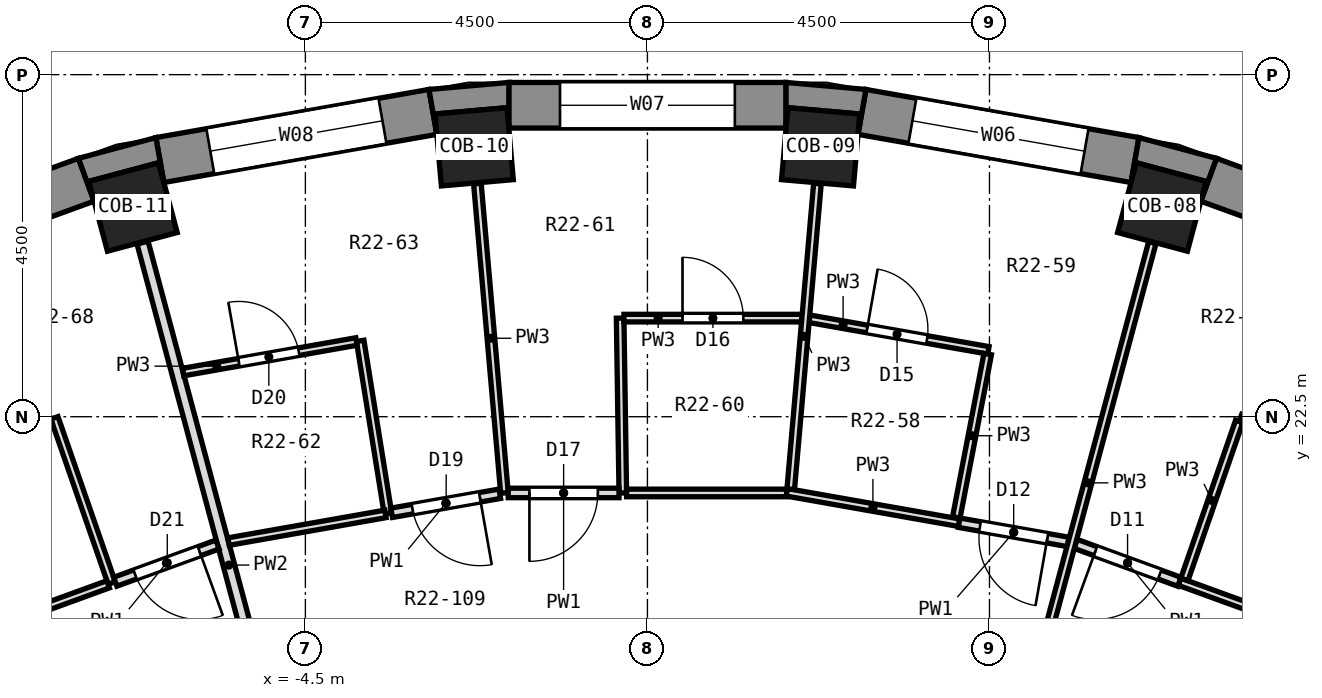
"""IFC4 building model, lengths in metres.
Left out: names, types, materials, properties, quantities, classifications, styles, units other than length and angle.
Written with IfcOpenShell. Run it as: python <this file> out.ifc"""

import sys

from ifc_helpers import new_model, si_unit, direction, frame, frame_2d, origin, origin_2d, place, context, subcontext, project, spatial, polyline, rectangle, outline, extrude, element, fill, save


model = new_model("IFC4")
c1 = context("Model", 3, precision=1e-05, world=origin(), true_north=direction((0.0, 1.0)))
c2 = subcontext(c1, "Body", "Model", "MODEL_VIEW")
j1 = project(units=[si_unit("LENGTHUNIT", "METRE"), si_unit("PLANEANGLEUNIT", "RADIAN")], contexts=[c1])
p1 = place(None, origin())
s1 = spatial("IfcSite", under=j1, at=p1, CompositionType="ELEMENT")
p2 = place(p1, origin())
s2 = spatial("IfcBuilding", under=s1, at=p2, CompositionType="ELEMENT")
p3 = place(p2, frame((0.0, 0.0, 141.4)))
s3 = spatial("IfcBuildingStorey", under=s2, at=p3, CompositionType="ELEMENT", Elevation=141.4)
for number, where, z_axis, x_axis in (
    (1, (6.768, 25.259, 0.0), (0.0, 0.0, 1.0), (0.259, 0.966, 0.0)),
    (2, (2.279, 26.051, 0.0), (0.0, 0.0, 1.0), (0.087, 0.996, 0.0)),
    (3, (-2.279, 26.051, 0.0), (0.0, 0.0, 1.0), (-0.087, 0.996, 0.0)),
    (4, (-6.768, 25.259, 0.0), (0.0, 0.0, 1.0), (-0.259, 0.966, 0.0)),
):
    element("IfcColumn", number, at=place(p3, frame(where, z_axis=z_axis, x_axis=x_axis)), inside=s3, PredefinedType="COLUMN", context=c2, shape_type="SweptSolid", body=[
        extrude(rectangle(XDim=0.95, YDim=0.95, at=origin_2d()), origin(), (0.0, 0.0, 1.0), 3.3),
    ])
p4 = place(p3, frame((10.811, 24.369, 0.0), z_axis=(0.0, 0.0, 1.0), x_axis=(-0.939703505393, 0.341990236633, 0.0)))
e5 = element("IfcWall", 5, at=p4, inside=s3, PredefinedType="SOLIDWALL", context=c2, shape_type="SweptSolid", body=[
    extrude(rectangle(XDim=3.648, YDim=0.6, at=frame_2d((1.824, 0.0))), origin(), (0.0, 0.0, 1.0), 2.8),
])
p5 = place(p4, frame((0.674, 0.0, 0.9)))
e6 = element("IfcOpeningElement", 6, at=p5, cuts=e5, PredefinedType="OPENING", context=c2, shape_type="SweptSolid", body=[
    extrude(rectangle(XDim=2.3, YDim=1.8, at=frame_2d((1.15, 0.9))), frame((0.0, 0.312, 0.0), z_axis=(0.0, -1.0, 0.0), x_axis=(1.0, 0.0, 0.0)), (0.0, 0.0, 1.0), 0.624),
])
p6 = place(p3, frame((6.415, 25.876, 0.0), z_axis=(0.0, 0.0, 1.0), x_axis=(-0.984803764455, 0.173670796382, 0.0)))
e7 = element("IfcWall", 7, at=p6, inside=s3, PredefinedType="SOLIDWALL", context=c2, shape_type="SweptSolid", body=[
    extrude(rectangle(XDim=3.648, YDim=0.6, at=frame_2d((1.824, 0.0))), origin(), (0.0, 0.0, 1.0), 2.8),
])
p7 = place(p6, frame((0.674, 0.0, 0.9)))
e8 = element("IfcOpeningElement", 8, at=p7, cuts=e7, PredefinedType="OPENING", context=c2, shape_type="SweptSolid", body=[
    extrude(rectangle(XDim=2.3, YDim=1.8, at=frame_2d((1.15, 0.9))), frame((0.0, 0.312, 0.0), z_axis=(0.0, -1.0, 0.0), x_axis=(1.0, 0.0, 0.0)), (0.0, 0.0, 1.0), 0.624),
])
p8 = place(p3, frame((1.824, 26.597, 0.0), z_axis=(0.0, 0.0, 1.0), x_axis=(-1.0, 0.0, 0.0)))
e9 = element("IfcWall", 9, at=p8, inside=s3, PredefinedType="SOLIDWALL", context=c2, shape_type="SweptSolid", body=[
    extrude(rectangle(XDim=3.648, YDim=0.6, at=frame_2d((1.824, 0.0))), origin(), (0.0, 0.0, 1.0), 2.8),
])
p9 = place(p8, frame((0.674, 0.0, 0.9)))
e10 = element("IfcOpeningElement", 10, at=p9, cuts=e9, PredefinedType="OPENING", context=c2, shape_type="SweptSolid", body=[
    extrude(rectangle(XDim=2.3, YDim=1.8, at=frame_2d((1.15, 0.9))), frame((0.0, 0.312, 0.0), z_axis=(0.0, -1.0, 0.0), x_axis=(1.0, 0.0, 0.0)), (0.0, 0.0, 1.0), 0.624),
])
p10 = place(p3, frame((-2.822, 26.51, 0.0), z_axis=(0.0, 0.0, 1.0), x_axis=(-0.984803764455, -0.173670796382, 0.0)))
e11 = element("IfcWall", 11, at=p10, inside=s3, PredefinedType="SOLIDWALL", context=c2, shape_type="SweptSolid", body=[
    extrude(rectangle(XDim=3.648, YDim=0.6, at=frame_2d((1.824, 0.0))), origin(), (0.0, 0.0, 1.0), 2.8),
])
p11 = place(p10, frame((0.674, 0.0, 0.9)))
e12 = element("IfcOpeningElement", 12, at=p11, cuts=e11, PredefinedType="OPENING", context=c2, shape_type="SweptSolid", body=[
    extrude(rectangle(XDim=2.3, YDim=1.8, at=frame_2d((1.15, 0.9))), frame((0.0, 0.312, 0.0), z_axis=(0.0, -1.0, 0.0), x_axis=(1.0, 0.0, 0.0)), (0.0, 0.0, 1.0), 0.624),
])
p12 = place(p3, frame((-7.383, 25.617, 0.0), z_axis=(0.0, 0.0, 1.0), x_axis=(-0.939703505393, -0.341990236633, 0.0)))
e13 = element("IfcWall", 13, at=p12, inside=s3, PredefinedType="SOLIDWALL", context=c2, shape_type="SweptSolid", body=[
    extrude(rectangle(XDim=3.648, YDim=0.6, at=frame_2d((1.824, 0.0))), origin(), (0.0, 0.0, 1.0), 2.8),
])
p13 = place(p12, frame((0.674, 0.0, 0.9)))
e14 = element("IfcOpeningElement", 14, at=p13, cuts=e13, PredefinedType="OPENING", context=c2, shape_type="SweptSolid", body=[
    extrude(rectangle(XDim=2.3, YDim=1.8, at=frame_2d((1.15, 0.9))), frame((0.0, 0.312, 0.0), z_axis=(0.0, -1.0, 0.0), x_axis=(1.0, 0.0, 0.0)), (0.0, 0.0, 1.0), 0.624),
])
p14 = place(p3, origin())
e15 = element("IfcWall", 15, at=p14, inside=s3, PredefinedType="SOLIDWALL", context=c2, shape_type="SweptSolid", body=[
    extrude(outline(polyline([(7.486, 25.899), (6.467, 26.172), (6.363, 25.581), (6.432, 25.841), (7.35, 25.595), (7.28, 25.335), (7.486, 25.899)])), origin(), (0.0, 0.0, 1.0), 2.8),
])
p15 = place(p3, origin())
e16 = element("IfcWall", 16, at=p15, inside=s3, PredefinedType="SOLIDWALL", context=c2, shape_type="SweptSolid", body=[
    extrude(outline(polyline([(2.875, 26.805), (1.824, 26.897), (1.824, 26.297), (1.847, 26.565), (2.794, 26.482), (2.77, 26.215), (2.875, 26.805)])), origin(), (0.0, 0.0, 1.0), 2.8),
])
p16 = place(p3, origin())
e17 = element("IfcWall", 17, at=p16, inside=s3, PredefinedType="SOLIDWALL", context=c2, shape_type="SweptSolid", body=[
    extrude(outline(polyline([(-2.875, 26.805), (-2.77, 26.215), (-2.794, 26.482), (-1.847, 26.565), (-1.824, 26.297), (-1.824, 26.897), (-2.875, 26.805)])), origin(), (0.0, 0.0, 1.0), 2.8),
])
p17 = place(p3, origin())
e18 = element("IfcWall", 18, at=p17, inside=s3, PredefinedType="SOLIDWALL", context=c2, shape_type="SweptSolid", body=[
    extrude(outline(polyline([(-6.467, 26.172), (-7.486, 25.899), (-7.28, 25.335), (-7.35, 25.595), (-6.432, 25.841), (-6.363, 25.581), (-6.467, 26.172)])), origin(), (0.0, 0.0, 1.0), 2.8),
])
p18 = place(p3, frame((-0.359, 23.797, 0.0), z_axis=(0.0, 0.0, 1.0), x_axis=(0.015177107463, -0.999884821071, 0.0)))
e19 = element("IfcWall", 19, at=p18, inside=s3, PredefinedType="PARTITIONING", context=c2, shape_type="SweptSolid", body=[
    extrude(rectangle(XDim=2.3, YDim=0.1, at=frame_2d((1.15, 0.0))), origin(), (0.0, 0.0, 1.0), 2.8),
])
p19 = place(p3, frame((-2.237, 25.567, 0.0), z_axis=(0.0, 0.0, 1.0), x_axis=(0.087119511186, -0.996197867279, 0.0)))
e20 = element("IfcWall", 20, at=p19, inside=s3, PredefinedType="PARTITIONING", context=c2, shape_type="SweptSolid", body=[
    extrude(rectangle(XDim=4.086, YDim=0.1, at=frame_2d((2.043, 0.0))), origin(), (0.0, 0.0, 1.0), 2.8),
])
p20 = place(p3, frame((-3.779, 23.498, 0.0), z_axis=(0.0, 0.0, 1.0), x_axis=(0.15868179071, -0.987329777378, 0.0)))
e21 = element("IfcWall", 21, at=p20, inside=s3, PredefinedType="PARTITIONING", context=c2, shape_type="SweptSolid", body=[
    extrude(rectangle(XDim=2.3, YDim=0.1, at=frame_2d((1.15, 0.0))), origin(), (0.0, 0.0, 1.0), 2.8),
])
p21 = place(p3, frame((-6.643, 24.791, 0.0), z_axis=(0.0, 0.0, 1.0), x_axis=(0.258629569049, -0.965976576328, 0.0)))
e22 = element("IfcWall", 22, at=p21, inside=s3, PredefinedType="PARTITIONING", context=c2, shape_type="SweptSolid", body=[
    extrude(rectangle(XDim=8.784, YDim=0.15, at=frame_2d((4.392, 0.0))), origin(), (0.0, 0.0, 1.0), 2.8),
])
p22 = place(p3, frame((-7.802, 22.485, 0.0), z_axis=(0.0, 0.0, 1.0), x_axis=(0.327763034971, -0.944759965762, 0.0)))
e23 = element("IfcWall", 23, at=p22, inside=s3, PredefinedType="PARTITIONING", context=c2, shape_type="SweptSolid", body=[
    extrude(rectangle(XDim=2.3, YDim=0.1, at=frame_2d((1.15, 0.0))), origin(), (0.0, 0.0, 1.0), 2.8),
])
p23 = place(p3, frame((5.633, 20.827, 0.0), z_axis=(0.0, 0.0, 1.0), x_axis=(0.939292989356, -0.343116132159, 0.0)))
e24 = element("IfcWall", 24, at=p23, inside=s3, PredefinedType="PARTITIONING", context=c2, shape_type="SweptSolid", body=[
    extrude(rectangle(XDim=1.456, YDim=0.125, at=frame_2d((0.728, 0.0))), origin(), (0.0, 0.0, 1.0), 2.8),
])
p24 = place(p23, frame((0.278, 0.0, 0.0)))
e25 = element("IfcOpeningElement", 25, at=p24, cuts=e24, PredefinedType="OPENING", context=c2, shape_type="SweptSolid", body=[
    extrude(rectangle(XDim=0.9, YDim=2.1, at=frame_2d((0.45, 1.05))), frame((0.0, 0.074, 0.0), z_axis=(0.0, -1.0, 0.0), x_axis=(1.0, 0.0, 0.0)), (0.0, 0.0, 1.0), 0.149),
])
p25 = place(p3, frame((7.001, 20.329, 0.0), z_axis=(0.0, 0.0, 1.0), x_axis=(0.939728749343, -0.341920864613, 0.0)))
e26 = element("IfcWall", 26, at=p25, inside=s3, PredefinedType="PARTITIONING", context=c2, shape_type="SweptSolid", body=[
    extrude(rectangle(XDim=2.205, YDim=0.1, at=frame_2d((1.103, 0.0))), origin(), (0.0, 0.0, 1.0), 2.8),
])
p26 = place(p3, frame((7.802, 22.485, 0.0), z_axis=(0.0, 0.0, 1.0), x_axis=(0.939659214987, -0.342111911063, 0.0)))
e27 = element("IfcWall", 27, at=p26, inside=s3, PredefinedType="PARTITIONING", context=c2, shape_type="SweptSolid", body=[
    extrude(rectangle(XDim=2.391, YDim=0.1, at=frame_2d((1.196, 0.0))), origin(), (0.0, 0.0, 1.0), 2.8),
])
p27 = place(p26, frame((0.821, 0.0, 0.0)))
e28 = element("IfcOpeningElement", 28, at=p27, cuts=e27, PredefinedType="OPENING", context=c2, shape_type="SweptSolid", body=[
    extrude(rectangle(XDim=0.8, YDim=2.1, at=frame_2d((0.4, 1.05))), frame((0.0, 0.062, 0.0), z_axis=(0.0, -1.0, 0.0), x_axis=(1.0, 0.0, 0.0)), (0.0, 0.0, 1.0), 0.124),
])
p28 = place(p3, frame((1.831, 21.506, 0.0), z_axis=(0.0, 0.0, 1.0), x_axis=(0.984783558818, -0.173785333909, 0.0)))
e29 = element("IfcWall", 29, at=p28, inside=s3, PredefinedType="PARTITIONING", context=c2, shape_type="SweptSolid", body=[
    extrude(rectangle(XDim=2.305, YDim=0.1, at=frame_2d((1.153, 0.0))), origin(), (0.0, 0.0, 1.0), 2.8),
])
p29 = place(p3, frame((4.101, 21.105, 0.0), z_axis=(0.0, 0.0, 1.0), x_axis=(0.984862774054, -0.173335848233, 0.0)))
e30 = element("IfcWall", 30, at=p29, inside=s3, PredefinedType="PARTITIONING", context=c2, shape_type="SweptSolid", body=[
    extrude(rectangle(XDim=1.456, YDim=0.125, at=frame_2d((0.728, 0.0))), origin(), (0.0, 0.0, 1.0), 2.8),
])
p30 = place(p29, frame((0.278, 0.0, 0.0)))
e31 = element("IfcOpeningElement", 31, at=p30, cuts=e30, PredefinedType="OPENING", context=c2, shape_type="SweptSolid", body=[
    extrude(rectangle(XDim=0.9, YDim=2.1, at=frame_2d((0.45, 1.05))), frame((0.0, 0.074, 0.0), z_axis=(0.0, -1.0, 0.0), x_axis=(1.0, 0.0, 0.0)), (0.0, 0.0, 1.0), 0.149),
])
p31 = place(p3, frame((2.131, 23.788, 0.0), z_axis=(0.0, 0.0, 1.0), x_axis=(0.984802055472, -0.173680486922, 0.0)))
e32 = element("IfcWall", 32, at=p31, inside=s3, PredefinedType="PARTITIONING", context=c2, shape_type="SweptSolid", body=[
    extrude(rectangle(XDim=2.391, YDim=0.1, at=frame_2d((1.196, 0.0))), origin(), (0.0, 0.0, 1.0), 2.8),
])
p32 = place(p31, frame((0.771, 0.0, 0.0)))
e33 = element("IfcOpeningElement", 33, at=p32, cuts=e32, PredefinedType="OPENING", context=c2, shape_type="SweptSolid", body=[
    extrude(rectangle(XDim=0.8, YDim=2.1, at=frame_2d((0.4, 1.05))), frame((0.0, 0.062, 0.0), z_axis=(0.0, -1.0, 0.0), x_axis=(1.0, 0.0, 0.0)), (0.0, 0.0, 1.0), 0.124),
])
p33 = place(p3, frame((-0.274, 21.497, 0.0), z_axis=(0.0, 0.0, 1.0), x_axis=(1.0, 0.0, 0.0)))
e34 = element("IfcWall", 34, at=p33, inside=s3, PredefinedType="PARTITIONING", context=c2, shape_type="SweptSolid", body=[
    extrude(rectangle(XDim=2.105, YDim=0.1, at=frame_2d((1.052, 0.0))), origin(), (0.0, 0.0, 1.0), 2.8),
])
p34 = place(p3, frame((-1.831, 21.497, 0.0), z_axis=(0.0, 0.0, 1.0), x_axis=(1.0, 0.0, 0.0)))
e35 = element("IfcWall", 35, at=p34, inside=s3, PredefinedType="PARTITIONING", context=c2, shape_type="SweptSolid", body=[
    extrude(rectangle(XDim=1.457, YDim=0.125, at=frame_2d((0.729, 0.0))), origin(), (0.0, 0.0, 1.0), 2.8),
])
p35 = place(p34, frame((0.279, 0.0, 0.0)))
e36 = element("IfcOpeningElement", 36, at=p35, cuts=e35, PredefinedType="OPENING", context=c2, shape_type="SweptSolid", body=[
    extrude(rectangle(XDim=0.9, YDim=2.1, at=frame_2d((0.45, 1.05))), frame((0.0, 0.074, 0.0), z_axis=(0.0, -1.0, 0.0), x_axis=(1.0, 0.0, 0.0)), (0.0, 0.0, 1.0), 0.149),
])
p36 = place(p3, frame((-0.309, 23.797, 0.0), z_axis=(0.0, 0.0, 1.0), x_axis=(1.0, 0.0, 0.0)))
e37 = element("IfcWall", 37, at=p36, inside=s3, PredefinedType="PARTITIONING", context=c2, shape_type="SweptSolid", body=[
    extrude(rectangle(XDim=2.341, YDim=0.1, at=frame_2d((1.17, 0.0))), origin(), (0.0, 0.0, 1.0), 2.8),
])
p37 = place(p36, frame((0.771, 0.0, 0.0)))
e38 = element("IfcOpeningElement", 38, at=p37, cuts=e37, PredefinedType="OPENING", context=c2, shape_type="SweptSolid", body=[
    extrude(rectangle(XDim=0.8, YDim=2.1, at=frame_2d((0.4, 1.05))), frame((0.0, 0.062, 0.0), z_axis=(0.0, -1.0, 0.0), x_axis=(1.0, 0.0, 0.0)), (0.0, 0.0, 1.0), 0.124),
])
p38 = place(p3, frame((-5.511, 20.857, 0.0), z_axis=(0.0, 0.0, 1.0), x_axis=(0.984775352835, 0.173831828066, 0.0)))
e39 = element("IfcWall", 39, at=p38, inside=s3, PredefinedType="PARTITIONING", context=c2, shape_type="SweptSolid", body=[
    extrude(rectangle(XDim=2.097, YDim=0.1, at=frame_2d((1.048, 0.0))), origin(), (0.0, 0.0, 1.0), 2.8),
])
p39 = place(p3, frame((-3.365, 21.236, 0.0), z_axis=(0.0, 0.0, 1.0), x_axis=(0.984839675328, 0.173467039809, 0.0)))
e40 = element("IfcWall", 40, at=p39, inside=s3, PredefinedType="PARTITIONING", context=c2, shape_type="SweptSolid", body=[
    extrude(rectangle(XDim=1.444, YDim=0.125, at=frame_2d((0.722, 0.0))), origin(), (0.0, 0.0, 1.0), 2.8),
])
p40 = place(p39, frame((0.278, 0.0, 0.0)))
e41 = element("IfcOpeningElement", 41, at=p40, cuts=e40, PredefinedType="OPENING", context=c2, shape_type="SweptSolid", body=[
    extrude(rectangle(XDim=0.9, YDim=2.1, at=frame_2d((0.45, 1.05))), frame((0.0, 0.074, 0.0), z_axis=(0.0, -1.0, 0.0), x_axis=(1.0, 0.0, 0.0)), (0.0, 0.0, 1.0), 0.149),
])
p41 = place(p3, frame((-6.109, 23.087, 0.0), z_axis=(0.0, 0.0, 1.0), x_axis=(0.984797350308, 0.173707164006, 0.0)))
e42 = element("IfcWall", 42, at=p41, inside=s3, PredefinedType="PARTITIONING", context=c2, shape_type="SweptSolid", body=[
    extrude(rectangle(XDim=2.316, YDim=0.1, at=frame_2d((1.158, 0.0))), origin(), (0.0, 0.0, 1.0), 2.8),
])
p42 = place(p41, frame((0.746, 0.0, 0.0)))
e43 = element("IfcOpeningElement", 43, at=p42, cuts=e42, PredefinedType="OPENING", context=c2, shape_type="SweptSolid", body=[
    extrude(rectangle(XDim=0.8, YDim=2.1, at=frame_2d((0.4, 1.05))), frame((0.0, 0.062, 0.0), z_axis=(0.0, -1.0, 0.0), x_axis=(1.0, 0.0, 0.0)), (0.0, 0.0, 1.0), 0.124),
])
p43 = place(p3, frame((-9.073, 19.575, 0.0), z_axis=(0.0, 0.0, 1.0), x_axis=(0.939725675468, 0.341929312674, 0.0)))
e44 = element("IfcWall", 44, at=p43, inside=s3, PredefinedType="PARTITIONING", context=c2, shape_type="SweptSolid", body=[
    extrude(rectangle(XDim=2.105, YDim=0.1, at=frame_2d((1.052, 0.0))), origin(), (0.0, 0.0, 1.0), 2.8),
])
p44 = place(p3, frame((-7.001, 20.329, 0.0), z_axis=(0.0, 0.0, 1.0), x_axis=(0.939788441711, 0.341756762663, 0.0)))
e45 = element("IfcWall", 45, at=p44, inside=s3, PredefinedType="PARTITIONING", context=c2, shape_type="SweptSolid", body=[
    extrude(rectangle(XDim=1.431, YDim=0.125, at=frame_2d((0.715, 0.0))), origin(), (0.0, 0.0, 1.0), 2.8),
])
p45 = place(p44, frame((0.278, 0.0, 0.0)))
e46 = element("IfcOpeningElement", 46, at=p45, cuts=e45, PredefinedType="OPENING", context=c2, shape_type="SweptSolid", body=[
    extrude(rectangle(XDim=0.9, YDim=2.1, at=frame_2d((0.45, 1.05))), frame((0.0, 0.074, 0.0), z_axis=(0.0, -1.0, 0.0), x_axis=(1.0, 0.0, 0.0)), (0.0, 0.0, 1.0), 0.149),
])
p46 = place(p3, frame((-10.049, 21.667, 0.0), z_axis=(0.0, 0.0, 1.0), x_axis=(0.939662448837, 0.342103028699, 0.0)))
e47 = element("IfcWall", 47, at=p46, inside=s3, PredefinedType="PARTITIONING", context=c2, shape_type="SweptSolid", body=[
    extrude(rectangle(XDim=2.342, YDim=0.1, at=frame_2d((1.171, 0.0))), origin(), (0.0, 0.0, 1.0), 2.8),
])
p47 = place(p46, frame((0.771, 0.0, 0.0)))
e48 = element("IfcOpeningElement", 48, at=p47, cuts=e47, PredefinedType="OPENING", context=c2, shape_type="SweptSolid", body=[
    extrude(rectangle(XDim=0.8, YDim=2.1, at=frame_2d((0.4, 1.05))), frame((0.0, 0.062, 0.0), z_axis=(0.0, -1.0, 0.0), x_axis=(1.0, 0.0, 0.0)), (0.0, 0.0, 1.0), 0.124),
])
p48 = place(p3, frame((7.064, 20.359, 0.0), z_axis=(0.0, 0.0, 1.0), x_axis=(0.327788872324, 0.944751001683, 0.0)))
e49 = element("IfcWall", 49, at=p48, inside=s3, PredefinedType="PARTITIONING", context=c2, shape_type="SweptSolid", body=[
    extrude(rectangle(XDim=2.2, YDim=0.1, at=frame_2d((1.1, 0.0))), origin(), (0.0, 0.0, 1.0), 2.8),
])
p49 = place(p3, frame((4.949, 18.469, 0.0), z_axis=(0.0, 0.0, 1.0), x_axis=(0.258793270627, 0.96593273217, 0.0)))
e50 = element("IfcWall", 50, at=p49, inside=s3, PredefinedType="PARTITIONING", context=c2, shape_type="SweptSolid", body=[
    extrude(rectangle(XDim=6.544, YDim=0.1, at=frame_2d((3.272, 0.0))), origin(), (0.0, 0.0, 1.0), 2.8),
])
p50 = place(p3, frame((4.064, 21.175, 0.0), z_axis=(0.0, 0.0, 1.0), x_axis=(0.188685986474, 0.982037473067, 0.0)))
e51 = element("IfcWall", 51, at=p50, inside=s3, PredefinedType="PARTITIONING", context=c2, shape_type="SweptSolid", body=[
    extrude(rectangle(XDim=2.188, YDim=0.1, at=frame_2d((1.094, 0.0))), origin(), (0.0, 0.0, 1.0), 2.8),
])
p51 = place(p3, frame((1.885, 21.547, 0.0), z_axis=(0.0, 0.0, 1.0), x_axis=(0.087109918438, 0.996198706137, 0.0)))
e52 = element("IfcWall", 52, at=p51, inside=s3, PredefinedType="PARTITIONING", context=c2, shape_type="SweptSolid", body=[
    extrude(rectangle(XDim=4.036, YDim=0.1, at=frame_2d((2.018, 0.0))), origin(), (0.0, 0.0, 1.0), 2.8),
])
p52 = place(p7, origin())
e53 = element("IfcWindow", 53, at=p52, inside=s3, PartitioningType="SINGLE_PANEL", PredefinedType="WINDOW", context=c2, shape_type="SweptSolid", body=[
    extrude(rectangle(XDim=2.3, YDim=1.8, at=frame_2d((1.15, 0.9))), frame((0.0, 0.18, 0.0), z_axis=(0.0, -1.0, 0.0), x_axis=(1.0, 0.0, 0.0)), (0.0, 0.0, 1.0), 0.06),
])
fill(e8, e53)
p53 = place(p9, origin())
e54 = element("IfcWindow", 54, at=p53, inside=s3, PartitioningType="SINGLE_PANEL", PredefinedType="WINDOW", context=c2, shape_type="SweptSolid", body=[
    extrude(rectangle(XDim=2.3, YDim=1.8, at=frame_2d((1.15, 0.9))), frame((0.0, 0.18, 0.0), z_axis=(0.0, -1.0, 0.0), x_axis=(1.0, 0.0, 0.0)), (0.0, 0.0, 1.0), 0.06),
])
fill(e10, e54)
p54 = place(p11, origin())
e55 = element("IfcWindow", 55, at=p54, inside=s3, PartitioningType="SINGLE_PANEL", PredefinedType="WINDOW", context=c2, shape_type="SweptSolid", body=[
    extrude(rectangle(XDim=2.3, YDim=1.8, at=frame_2d((1.15, 0.9))), frame((0.0, 0.18, 0.0), z_axis=(0.0, -1.0, 0.0), x_axis=(1.0, 0.0, 0.0)), (0.0, 0.0, 1.0), 0.06),
])
fill(e12, e55)
p55 = place(p24, frame((0.9, 0.0, 0.0), z_axis=(0.0, 0.0, 1.0), x_axis=(-1.0, 0.0, 0.0)))
e56 = element("IfcDoor", 56, at=p55, inside=s3, OperationType="SINGLE_SWING_RIGHT", PredefinedType="DOOR", context=c2, shape_type="SweptSolid", body=[
    extrude(rectangle(XDim=0.9, YDim=2.1, at=frame_2d((0.45, 1.05))), frame((0.0, 0.025, 0.0), z_axis=(0.0, -1.0, 0.0), x_axis=(1.0, 0.0, 0.0)), (0.0, 0.0, 1.0), 0.05),
])
fill(e25, e56)
p56 = place(p30, frame((0.9, 0.0, 0.0), z_axis=(0.0, 0.0, 1.0), x_axis=(-1.0, 0.0, 0.0)))
e57 = element("IfcDoor", 57, at=p56, inside=s3, OperationType="SINGLE_SWING_LEFT", PredefinedType="DOOR", context=c2, shape_type="SweptSolid", body=[
    extrude(rectangle(XDim=0.9, YDim=2.1, at=frame_2d((0.45, 1.05))), frame((0.0, 0.025, 0.0), z_axis=(0.0, -1.0, 0.0), x_axis=(1.0, 0.0, 0.0)), (0.0, 0.0, 1.0), 0.05),
])
fill(e31, e57)
p57 = place(p32, origin())
e58 = element("IfcDoor", 58, at=p57, inside=s3, OperationType="SINGLE_SWING_LEFT", PredefinedType="DOOR", context=c2, shape_type="SweptSolid", body=[
    extrude(rectangle(XDim=0.8, YDim=2.1, at=frame_2d((0.4, 1.05))), frame((0.0, 0.025, 0.0), z_axis=(0.0, -1.0, 0.0), x_axis=(1.0, 0.0, 0.0)), (0.0, 0.0, 1.0), 0.05),
])
fill(e33, e58)
p58 = place(p37, origin())
e59 = element("IfcDoor", 59, at=p58, inside=s3, OperationType="SINGLE_SWING_LEFT", PredefinedType="DOOR", context=c2, shape_type="SweptSolid", body=[
    extrude(rectangle(XDim=0.8, YDim=2.1, at=frame_2d((0.4, 1.05))), frame((0.0, 0.025, 0.0), z_axis=(0.0, -1.0, 0.0), x_axis=(1.0, 0.0, 0.0)), (0.0, 0.0, 1.0), 0.05),
])
fill(e38, e59)
p59 = place(p35, frame((0.9, 0.0, 0.0), z_axis=(0.0, 0.0, 1.0), x_axis=(-1.0, 0.0, 0.0)))
e60 = element("IfcDoor", 60, at=p59, inside=s3, OperationType="SINGLE_SWING_RIGHT", PredefinedType="DOOR", context=c2, shape_type="SweptSolid", body=[
    extrude(rectangle(XDim=0.9, YDim=2.1, at=frame_2d((0.45, 1.05))), frame((0.0, 0.025, 0.0), z_axis=(0.0, -1.0, 0.0), x_axis=(1.0, 0.0, 0.0)), (0.0, 0.0, 1.0), 0.05),
])
fill(e36, e60)
p60 = place(p40, frame((0.9, 0.0, 0.0), z_axis=(0.0, 0.0, 1.0), x_axis=(-1.0, 0.0, 0.0)))
e61 = element("IfcDoor", 61, at=p60, inside=s3, OperationType="SINGLE_SWING_LEFT", PredefinedType="DOOR", context=c2, shape_type="SweptSolid", body=[
    extrude(rectangle(XDim=0.9, YDim=2.1, at=frame_2d((0.45, 1.05))), frame((0.0, 0.025, 0.0), z_axis=(0.0, -1.0, 0.0), x_axis=(1.0, 0.0, 0.0)), (0.0, 0.0, 1.0), 0.05),
])
fill(e41, e61)
p61 = place(p42, origin())
e62 = element("IfcDoor", 62, at=p61, inside=s3, OperationType="SINGLE_SWING_LEFT", PredefinedType="DOOR", context=c2, shape_type="SweptSolid", body=[
    extrude(rectangle(XDim=0.8, YDim=2.1, at=frame_2d((0.4, 1.05))), frame((0.0, 0.025, 0.0), z_axis=(0.0, -1.0, 0.0), x_axis=(1.0, 0.0, 0.0)), (0.0, 0.0, 1.0), 0.05),
])
fill(e43, e62)
p62 = place(p45, frame((0.9, 0.0, 0.0), z_axis=(0.0, 0.0, 1.0), x_axis=(-1.0, 0.0, 0.0)))
e63 = element("IfcDoor", 63, at=p62, inside=s3, OperationType="SINGLE_SWING_LEFT", PredefinedType="DOOR", context=c2, shape_type="SweptSolid", body=[
    extrude(rectangle(XDim=0.9, YDim=2.1, at=frame_2d((0.45, 1.05))), frame((0.0, 0.025, 0.0), z_axis=(0.0, -1.0, 0.0), x_axis=(1.0, 0.0, 0.0)), (0.0, 0.0, 1.0), 0.05),
])
fill(e46, e63)
save(model, sys.argv[1])
